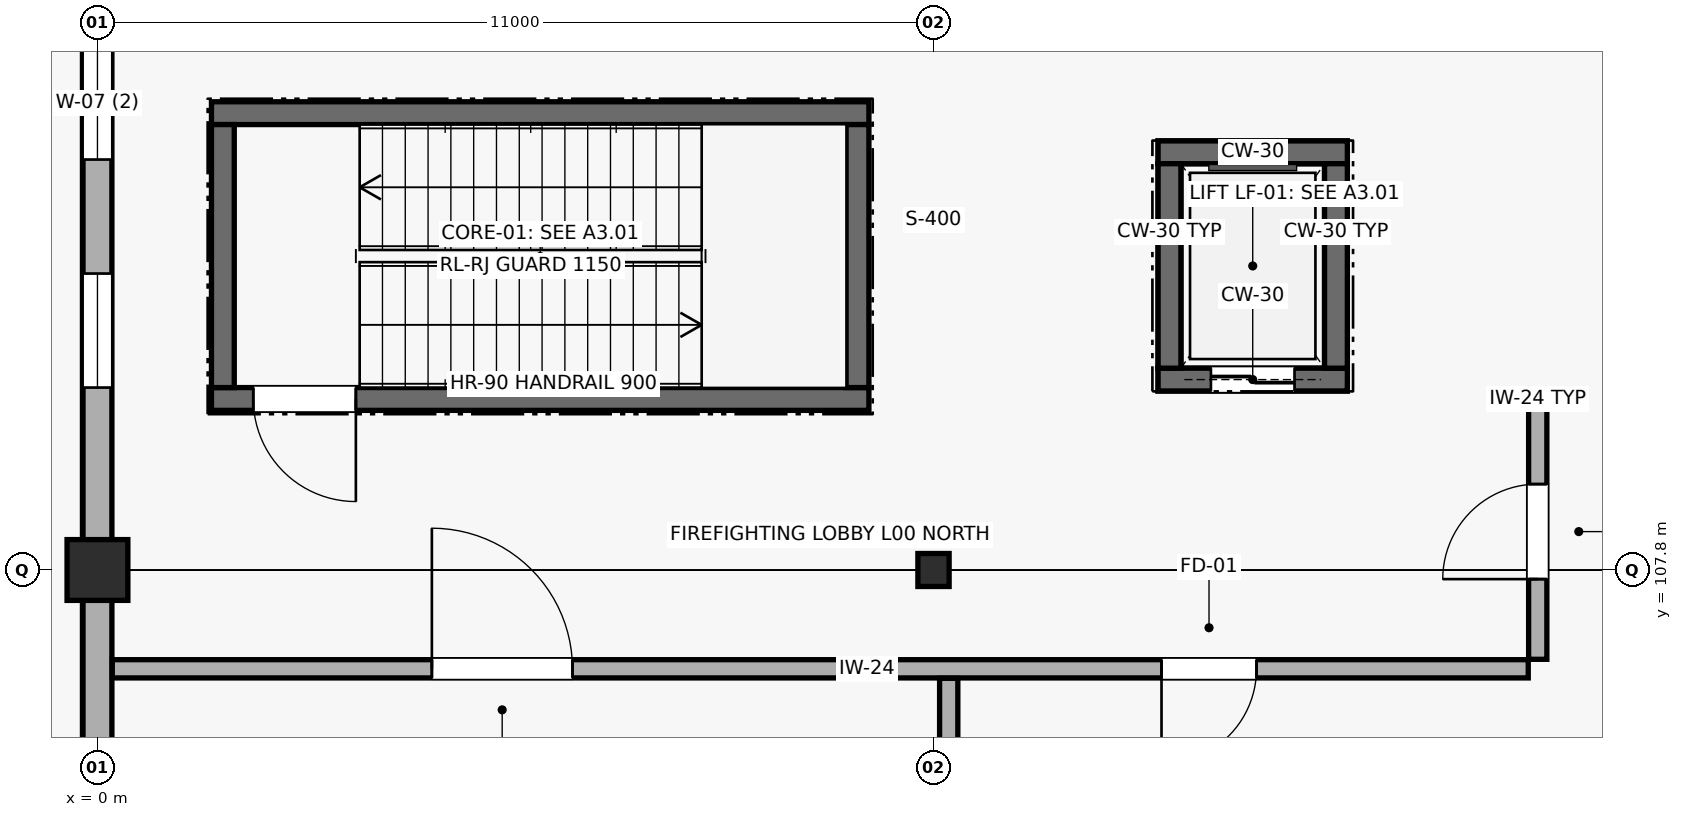
"""IFC4 building model, lengths in metres.
Left out: names, types, materials, properties, quantities, classifications, styles, units other than length and angle.
Written with IfcOpenShell. Run it as: python <this file> out.ifc"""

import sys

from ifc_helpers import new_model, si_unit, direction, frame, frame_2d, origin, origin_2d, place, context, subcontext, project, spatial, rectangle, i_section, extrude, element, fill, save


model = new_model("IFC4")
c1 = context("Model", 3, precision=1e-05, world=origin(), true_north=direction((0.0, 1.0)))
c2 = subcontext(c1, "Body", "Model", "MODEL_VIEW")
j1 = project(units=[si_unit("LENGTHUNIT", "METRE"), si_unit("PLANEANGLEUNIT", "RADIAN")], contexts=[c1])
p1 = place(None, origin())
s1 = spatial("IfcSite", under=j1, at=p1, CompositionType="ELEMENT")
p2 = place(p1, origin())
s2 = spatial("IfcBuilding", under=s1, at=p2, CompositionType="ELEMENT")
p3 = place(p2, origin())
s3 = spatial("IfcBuildingStorey", under=s2, at=p3, CompositionType="ELEMENT", Elevation=0.0)
p4 = place(p3, frame((0.0, 107.8, 0.0), z_axis=(0.0, 0.0, 1.0), x_axis=(1.0, 0.0, 0.0)))
e1 = element("IfcColumn", 1, at=p4, inside=s3, PredefinedType="COLUMN", context=c2, shape_type="SweptSolid", body=[
    extrude(rectangle(XDim=0.8, YDim=0.8, at=origin_2d()), origin(), (0.0, 0.0, 1.0), 5.4),
])
p5 = place(p3, frame((11.0, 107.8, 0.0), z_axis=(0.0, 0.0, 1.0), x_axis=(1.0, 0.0, 0.0)))
e2 = element("IfcColumn", 2, at=p5, inside=s3, PredefinedType="COLUMN", context=c2, shape_type="SweptSolid", body=[
    extrude(i_section(OverallWidth=0.411, OverallDepth=0.434, WebThickness=0.036, FlangeThickness=0.057, at=origin_2d()), origin(), (0.0, 0.0, 1.0), 5.4),
])
p6 = place(p3, frame((0.0, 107.402, 0.0), z_axis=(0.0, 0.0, 1.0), x_axis=(0.0, -1.0, 0.0)))
e3 = element("IfcWall", 3, at=p6, inside=s3, PredefinedType="SOLIDWALL", context=c2, shape_type="SweptSolid", body=[
    extrude(rectangle(XDim=8.404, YDim=0.38, at=frame_2d((4.202, 0.0))), origin(), (0.0, 0.0, 1.0), 4.525),
])
p7 = place(p6, frame((3.202, 0.0, 0.0)))
e4 = element("IfcOpeningElement", 4, at=p7, cuts=e3, PredefinedType="OPENING", context=c2, shape_type="SweptSolid", body=[
    extrude(rectangle(XDim=1.8, YDim=2.4, at=frame_2d((0.9, 1.2))), frame((0.0, 0.2, 0.0), z_axis=(0.0, -1.0, 0.0), x_axis=(1.0, 0.0, 0.0)), (0.0, 0.0, 1.0), 0.4),
])
p8 = place(p3, frame((0.0, 116.602, 0.0), z_axis=(0.0, 0.0, 1.0), x_axis=(0.0, -1.0, 0.0)))
e5 = element("IfcWall", 5, at=p8, inside=s3, PredefinedType="SOLIDWALL", context=c2, shape_type="SweptSolid", body=[
    extrude(rectangle(XDim=8.404, YDim=0.38, at=frame_2d((4.202, 0.0))), origin(), (0.0, 0.0, 1.0), 4.525),
])
p9 = place(p8, frame((1.902, 0.0, 0.95)))
e6 = element("IfcOpeningElement", 6, at=p9, cuts=e5, PredefinedType="OPENING", context=c2, shape_type="SweptSolid", body=[
    extrude(rectangle(XDim=1.5, YDim=2.25, at=frame_2d((0.75, 1.125))), frame((0.0, 0.2, 0.0), z_axis=(0.0, -1.0, 0.0), x_axis=(1.0, 0.0, 0.0)), (0.0, 0.0, 1.0), 0.4),
])
p10 = place(p8, frame((4.902, 0.0, 0.95)))
e7 = element("IfcOpeningElement", 7, at=p10, cuts=e5, PredefinedType="OPENING", context=c2, shape_type="SweptSolid", body=[
    extrude(rectangle(XDim=1.5, YDim=2.25, at=frame_2d((0.75, 1.125))), frame((0.0, 0.2, 0.0), z_axis=(0.0, -1.0, 0.0), x_axis=(1.0, 0.0, 0.0)), (0.0, 0.0, 1.0), 0.4),
])
p11 = place(p3, frame((1.5, 110.05, 0.0), z_axis=(0.0, 0.0, 1.0), x_axis=(1.0, 0.0, 0.0)))
e8 = element("IfcWall", 8, at=p11, inside=s3, PredefinedType="SHEAR", context=c2, shape_type="SweptSolid", body=[
    extrude(rectangle(XDim=8.65, YDim=0.3, at=frame_2d((4.325, 0.0))), origin(), (0.0, 0.0, 1.0), 5.18),
])
p12 = place(p11, frame((0.55, 0.0, 0.0)))
e9 = element("IfcOpeningElement", 9, at=p12, cuts=e8, PredefinedType="OPENING", context=c2, shape_type="SweptSolid", body=[
    extrude(rectangle(XDim=1.35, YDim=2.2, at=frame_2d((0.675, 1.1))), frame((0.0, 0.16, 0.0), z_axis=(0.0, -1.0, 0.0), x_axis=(1.0, 0.0, 0.0)), (0.0, 0.0, 1.0), 0.32),
])
p13 = place(p3, frame((10.15, 113.81, 0.0), z_axis=(0.0, 0.0, 1.0), x_axis=(-1.0, 0.0, 0.0)))
e10 = element("IfcWall", 10, at=p13, inside=s3, PredefinedType="SHEAR", context=c2, shape_type="SweptSolid", body=[
    extrude(rectangle(XDim=8.65, YDim=0.3, at=frame_2d((4.325, 0.0))), origin(), (0.0, 0.0, 1.0), 5.18),
])
for number, where, z_axis, x_axis in (
    (11, (1.65, 113.66, 0.0), (0.0, 0.0, 1.0), (0.0, -1.0, 0.0)),
    (12, (10.0, 110.2, 0.0), (0.0, 0.0, 1.0), (0.0, 1.0, 0.0)),
):
    element("IfcWall", number, at=place(p3, frame(where, z_axis=z_axis, x_axis=x_axis)), inside=s3, PredefinedType="SHEAR", context=c2, shape_type="SweptSolid", body=[
        extrude(rectangle(XDim=3.46, YDim=0.3, at=frame_2d((1.73, 0.0))), origin(), (0.0, 0.0, 1.0), 5.18),
    ])
for number, where, z_axis, x_axis in (
    (13, (13.955, 110.305, -1.4), (0.0, 0.0, 1.0), (1.0, 0.0, 0.0)),
    (14, (16.445, 113.295, -1.4), (0.0, 0.0, 1.0), (-1.0, 0.0, 0.0)),
):
    element("IfcWall", number, at=place(p3, frame(where, z_axis=z_axis, x_axis=x_axis)), inside=s3, PredefinedType="SHEAR", context=c2, shape_type="SweptSolid", body=[
        extrude(rectangle(XDim=2.49, YDim=0.3, at=frame_2d((1.245, 0.0))), origin(), (0.0, 0.0, 1.0), 1.0),
    ])
for number, where, z_axis, x_axis in (
    (15, (14.105, 113.145, -1.4), (0.0, 0.0, 1.0), (0.0, -1.0, 0.0)),
    (16, (16.295, 110.455, -1.4), (0.0, 0.0, 1.0), (0.0, 1.0, 0.0)),
):
    element("IfcWall", number, at=place(p3, frame(where, z_axis=z_axis, x_axis=x_axis)), inside=s3, PredefinedType="SHEAR", context=c2, shape_type="SweptSolid", body=[
        extrude(rectangle(XDim=2.69, YDim=0.3, at=frame_2d((1.345, 0.0))), origin(), (0.0, 0.0, 1.0), 1.0),
    ])
p14 = place(p3, frame((13.955, 110.305, 0.0), z_axis=(0.0, 0.0, 1.0), x_axis=(1.0, 0.0, 0.0)))
e17 = element("IfcWall", 17, at=p14, inside=s3, PredefinedType="SHEAR", context=c2, shape_type="SweptSolid", body=[
    extrude(rectangle(XDim=2.49, YDim=0.3, at=frame_2d((1.245, 0.0))), origin(), (0.0, 0.0, 1.0), 5.18),
])
p15 = place(p14, frame((0.695, 0.0, 0.0)))
e18 = element("IfcOpeningElement", 18, at=p15, cuts=e17, PredefinedType="OPENING", context=c2, shape_type="SweptSolid", body=[
    extrude(rectangle(XDim=1.1, YDim=2.15, at=frame_2d((0.55, 1.075))), frame((0.0, 0.16, 0.0), z_axis=(0.0, -1.0, 0.0), x_axis=(1.0, 0.0, 0.0)), (0.0, 0.0, 1.0), 0.32),
])
p16 = place(p3, frame((16.445, 113.295, 0.0), z_axis=(0.0, 0.0, 1.0), x_axis=(-1.0, 0.0, 0.0)))
e19 = element("IfcWall", 19, at=p16, inside=s3, PredefinedType="SHEAR", context=c2, shape_type="SweptSolid", body=[
    extrude(rectangle(XDim=2.49, YDim=0.3, at=frame_2d((1.245, 0.0))), origin(), (0.0, 0.0, 1.0), 5.18),
])
for number, where, z_axis, x_axis in (
    (20, (14.105, 113.145, 0.0), (0.0, 0.0, 1.0), (0.0, -1.0, 0.0)),
    (21, (16.295, 110.455, 0.0), (0.0, 0.0, 1.0), (0.0, 1.0, 0.0)),
):
    element("IfcWall", number, at=place(p3, frame(where, z_axis=z_axis, x_axis=x_axis)), inside=s3, PredefinedType="SHEAR", context=c2, shape_type="SweptSolid", body=[
        extrude(rectangle(XDim=2.69, YDim=0.3, at=frame_2d((1.345, 0.0))), origin(), (0.0, 0.0, 1.0), 5.18),
    ])
p17 = place(p3, frame((0.195, 106.5, 0.0), z_axis=(0.0, 0.0, 1.0), x_axis=(1.0, 0.0, 0.0)))
e22 = element("IfcWall", 22, at=p17, inside=s3, PredefinedType="PARTITIONING", context=c2, shape_type="SweptSolid", body=[
    extrude(rectangle(XDim=18.63, YDim=0.24, at=frame_2d((9.315, 0.0))), origin(), (0.0, 0.0, 1.0), 4.525),
])
p18 = place(p17, frame((4.205, 0.0, 0.0)))
e23 = element("IfcOpeningElement", 23, at=p18, cuts=e22, PredefinedType="OPENING", context=c2, shape_type="SweptSolid", body=[
    extrude(rectangle(XDim=1.85, YDim=2.4, at=frame_2d((0.925, 1.2))), frame((0.0, 0.13, 0.0), z_axis=(0.0, -1.0, 0.0), x_axis=(1.0, 0.0, 0.0)), (0.0, 0.0, 1.0), 0.26),
])
p19 = place(p17, frame((13.805, 0.0, 0.0)))
e24 = element("IfcOpeningElement", 24, at=p19, cuts=e22, PredefinedType="OPENING", context=c2, shape_type="SweptSolid", body=[
    extrude(rectangle(XDim=1.25, YDim=2.2, at=frame_2d((0.625, 1.1))), frame((0.0, 0.13, 0.0), z_axis=(0.0, -1.0, 0.0), x_axis=(1.0, 0.0, 0.0)), (0.0, 0.0, 1.0), 0.26),
])
p20 = place(p3, frame((11.2, 80.625, 0.0), z_axis=(0.0, 0.0, 1.0), x_axis=(0.0, 1.0, 0.0)))
e25 = element("IfcWall", 25, at=p20, inside=s3, PredefinedType="PARTITIONING", context=c2, shape_type="SweptSolid", body=[
    extrude(rectangle(XDim=25.75, YDim=0.24, at=frame_2d((12.875, 0.0))), origin(), (0.0, 0.0, 1.0), 4.425),
])
p21 = place(p20, frame((9.605, 0.0, 0.0)))
e26 = element("IfcOpeningElement", 26, at=p21, cuts=e25, PredefinedType="OPENING", context=c2, shape_type="SweptSolid", body=[
    extrude(rectangle(XDim=1.85, YDim=2.4, at=frame_2d((0.925, 1.2))), frame((0.0, 0.13, 0.0), z_axis=(0.0, -1.0, 0.0), x_axis=(1.0, 0.0, 0.0)), (0.0, 0.0, 1.0), 0.26),
])
p22 = place(p3, frame((18.95, 106.625, 0.0), z_axis=(0.0, 0.0, 1.0), x_axis=(0.0, 1.0, 0.0)))
e27 = element("IfcWall", 27, at=p22, inside=s3, PredefinedType="PARTITIONING", context=c2, shape_type="SweptSolid", body=[
    extrude(rectangle(XDim=3.525, YDim=0.24, at=frame_2d((1.762, 0.0))), origin(), (0.0, 0.0, 1.0), 4.425),
])
p23 = place(p22, frame((1.055, 0.0, 0.0)))
e28 = element("IfcOpeningElement", 28, at=p23, cuts=e27, PredefinedType="OPENING", context=c2, shape_type="SweptSolid", body=[
    extrude(rectangle(XDim=1.25, YDim=2.2, at=frame_2d((0.625, 1.1))), frame((0.0, 0.13, 0.0), z_axis=(0.0, -1.0, 0.0), x_axis=(1.0, 0.0, 0.0)), (0.0, 0.0, 1.0), 0.26),
])
p24 = place(p9, origin())
e29 = element("IfcWindow", 29, at=p24, inside=s3, PartitioningType="SINGLE_PANEL", PredefinedType="WINDOW", context=c2, shape_type="SweptSolid", body=[
    extrude(rectangle(XDim=1.5, YDim=2.25, at=frame_2d((0.75, 1.125))), frame((0.0, 0.03, 0.0), z_axis=(0.0, -1.0, 0.0), x_axis=(1.0, 0.0, 0.0)), (0.0, 0.0, 1.0), 0.06),
])
fill(e6, e29)
p25 = place(p10, origin())
e30 = element("IfcWindow", 30, at=p25, inside=s3, PartitioningType="SINGLE_PANEL", PredefinedType="WINDOW", context=c2, shape_type="SweptSolid", body=[
    extrude(rectangle(XDim=1.5, YDim=2.25, at=frame_2d((0.75, 1.125))), frame((0.0, 0.03, 0.0), z_axis=(0.0, -1.0, 0.0), x_axis=(1.0, 0.0, 0.0)), (0.0, 0.0, 1.0), 0.06),
])
fill(e7, e30)
p26 = place(p12, frame((1.35, 0.0, 0.0), z_axis=(0.0, 0.0, 1.0), x_axis=(-1.0, 0.0, 0.0)))
e31 = element("IfcDoor", 31, at=p26, inside=s3, OperationType="SINGLE_SWING_LEFT", PredefinedType="DOOR", context=c2, shape_type="SweptSolid", body=[
    extrude(rectangle(XDim=1.35, YDim=2.2, at=frame_2d((0.675, 1.1))), frame((0.0, 0.025, 0.0), z_axis=(0.0, -1.0, 0.0), x_axis=(1.0, 0.0, 0.0)), (0.0, 0.0, 1.0), 0.05),
])
fill(e9, e31)
p27 = place(p15, frame((1.1, 0.0, 0.0), z_axis=(0.0, 0.0, 1.0), x_axis=(-1.0, 0.0, 0.0)))
e32 = element("IfcDoor", 32, at=p27, inside=s3, OperationType="DOUBLE_DOOR_SLIDING", PredefinedType="DOOR", context=c2, shape_type="SweptSolid", body=[
    extrude(rectangle(XDim=1.1, YDim=2.15, at=frame_2d((0.55, 1.075))), frame((0.0, 0.025, 0.0), z_axis=(0.0, -1.0, 0.0), x_axis=(1.0, 0.0, 0.0)), (0.0, 0.0, 1.0), 0.05),
])
fill(e18, e32)
p28 = place(p18, origin())
e33 = element("IfcDoor", 33, at=p28, inside=s3, OperationType="SINGLE_SWING_LEFT", PredefinedType="DOOR", context=c2, shape_type="SweptSolid", body=[
    extrude(rectangle(XDim=1.85, YDim=2.4, at=frame_2d((0.925, 1.2))), frame((0.0, 0.025, 0.0), z_axis=(0.0, -1.0, 0.0), x_axis=(1.0, 0.0, 0.0)), (0.0, 0.0, 1.0), 0.05),
])
fill(e23, e33)
p29 = place(p19, frame((1.25, 0.0, 0.0), z_axis=(0.0, 0.0, 1.0), x_axis=(-1.0, 0.0, 0.0)))
e34 = element("IfcDoor", 34, at=p29, inside=s3, OperationType="SINGLE_SWING_RIGHT", PredefinedType="DOOR", context=c2, shape_type="SweptSolid", body=[
    extrude(rectangle(XDim=1.25, YDim=2.2, at=frame_2d((0.625, 1.1))), frame((0.0, 0.025, 0.0), z_axis=(0.0, -1.0, 0.0), x_axis=(1.0, 0.0, 0.0)), (0.0, 0.0, 1.0), 0.05),
])
fill(e24, e34)
p30 = place(p23, origin())
e35 = element("IfcDoor", 35, at=p30, inside=s3, OperationType="SINGLE_SWING_LEFT", PredefinedType="DOOR", context=c2, shape_type="SweptSolid", body=[
    extrude(rectangle(XDim=1.25, YDim=2.2, at=frame_2d((0.625, 1.1))), frame((0.0, 0.025, 0.0), z_axis=(0.0, -1.0, 0.0), x_axis=(1.0, 0.0, 0.0)), (0.0, 0.0, 1.0), 0.05),
])
fill(e28, e35)
save(model, sys.argv[1])
